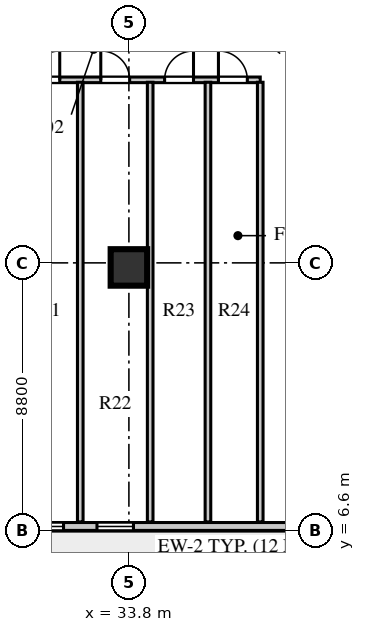
"""IFC4 building model, lengths in metres.
Left out: names, types, materials, properties, quantities, classifications, styles, units other than length and angle.
Written with IfcOpenShell. Run it as: python <this file> out.ifc"""

import sys

from ifc_helpers import new_model, si_unit, direction, frame, frame_2d, origin, origin_2d, place, context, subcontext, project, spatial, rectangle, extrude, element, fill, save


model = new_model("IFC4")
c1 = context("Model", 3, precision=1e-05, world=origin(), true_north=direction((0.0, 1.0)))
c2 = subcontext(c1, "Body", "Model", "MODEL_VIEW")
j1 = project(units=[si_unit("LENGTHUNIT", "METRE"), si_unit("PLANEANGLEUNIT", "RADIAN")], contexts=[c1])
p1 = place(None, origin())
s1 = spatial("IfcSite", under=j1, at=p1, CompositionType="ELEMENT")
p2 = place(p1, origin())
s2 = spatial("IfcBuilding", under=s1, at=p2, CompositionType="ELEMENT")
p3 = place(p2, frame((0.0, 0.0, 74.0)))
s3 = spatial("IfcBuildingStorey", under=s2, at=p3, CompositionType="ELEMENT", Elevation=74.0)
p4 = place(p3, frame((33.8, 15.25, 0.0), z_axis=(0.0, 0.0, 1.0), x_axis=(1.0, 0.0, 0.0)))
e1 = element("IfcColumn", 1, at=p4, inside=s3, PredefinedType="COLUMN", context=c2, shape_type="SweptSolid", body=[
    extrude(rectangle(XDim=1.2, YDim=1.2, at=origin_2d()), origin(), (0.0, 0.0, 1.0), 3.72),
])
p5 = place(p3, frame((12.3, 6.73, 0.0), z_axis=(0.0, 0.0, 1.0), x_axis=(1.0, 0.0, 0.0)))
e2 = element("IfcWall", 2, at=p5, inside=s3, PredefinedType="SOLIDWALL", context=c2, shape_type="SweptSolid", body=[
    extrude(rectangle(XDim=34.0, YDim=0.26, at=frame_2d((17.0, 0.0))), origin(), (0.0, 0.0, 1.0), 3.72),
])
p6 = place(p5, frame((0.95, 0.0, 0.0)))
e3 = element("IfcOpeningElement", 3, at=p6, cuts=e2, PredefinedType="OPENING", context=c2, shape_type="SweptSolid", body=[
    extrude(rectangle(XDim=1.0, YDim=2.05, at=frame_2d((0.5, 1.025))), frame((0.0, 0.14, 0.0), z_axis=(0.0, -1.0, 0.0), x_axis=(1.0, 0.0, 0.0)), (0.0, 0.0, 1.0), 0.28),
])
p7 = place(p5, frame((7.355, 0.0, 0.8)))
e4 = element("IfcOpeningElement", 4, at=p7, cuts=e2, PredefinedType="OPENING", context=c2, shape_type="SweptSolid", body=[
    extrude(rectangle(XDim=2.25, YDim=2.0, at=frame_2d((1.125, 1.0))), frame((0.0, 0.14, 0.0), z_axis=(0.0, -1.0, 0.0), x_axis=(1.0, 0.0, 0.0)), (0.0, 0.0, 1.0), 0.28),
])
p8 = place(p5, frame((15.85, 0.0, 0.8)))
e5 = element("IfcOpeningElement", 5, at=p8, cuts=e2, PredefinedType="OPENING", context=c2, shape_type="SweptSolid", body=[
    extrude(rectangle(XDim=1.2, YDim=1.75, at=frame_2d((0.6, 0.875))), frame((0.0, 0.14, 0.0), z_axis=(0.0, -1.0, 0.0), x_axis=(1.0, 0.0, 0.0)), (0.0, 0.0, 1.0), 0.28),
])
p9 = place(p5, frame((18.15, 0.0, 0.8)))
e6 = element("IfcOpeningElement", 6, at=p9, cuts=e2, PredefinedType="OPENING", context=c2, shape_type="SweptSolid", body=[
    extrude(rectangle(XDim=1.2, YDim=1.75, at=frame_2d((0.6, 0.875))), frame((0.0, 0.14, 0.0), z_axis=(0.0, -1.0, 0.0), x_axis=(1.0, 0.0, 0.0)), (0.0, 0.0, 1.0), 0.28),
])
p10 = place(p5, frame((20.45, 0.0, 0.8)))
e7 = element("IfcOpeningElement", 7, at=p10, cuts=e2, PredefinedType="OPENING", context=c2, shape_type="SweptSolid", body=[
    extrude(rectangle(XDim=1.2, YDim=1.75, at=frame_2d((0.6, 0.875))), frame((0.0, 0.14, 0.0), z_axis=(0.0, -1.0, 0.0), x_axis=(1.0, 0.0, 0.0)), (0.0, 0.0, 1.0), 0.28),
])
p11 = place(p5, frame((28.655, 0.0, 0.8)))
e8 = element("IfcOpeningElement", 8, at=p11, cuts=e2, PredefinedType="OPENING", context=c2, shape_type="SweptSolid", body=[
    extrude(rectangle(XDim=2.4, YDim=2.05, at=frame_2d((1.2, 1.025))), frame((0.0, 0.14, 0.0), z_axis=(0.0, -1.0, 0.0), x_axis=(1.0, 0.0, 0.0)), (0.0, 0.0, 1.0), 0.28),
])
p12 = place(p3, frame((25.25, 21.42, 0.0), z_axis=(0.0, 0.0, 1.0), x_axis=(1.0, 0.0, 0.0)))
e9 = element("IfcWall", 9, at=p12, inside=s3, PredefinedType="SOLIDWALL", context=c2, shape_type="SweptSolid", body=[
    extrude(rectangle(XDim=12.87, YDim=0.185, at=frame_2d((6.435, 0.0))), origin(), (0.0, 0.0, 1.0), 3.32),
])
p13 = place(p12, frame((0.725, 0.0, 0.0)))
e10 = element("IfcOpeningElement", 10, at=p13, cuts=e9, PredefinedType="OPENING", context=c2, shape_type="SweptSolid", body=[
    extrude(rectangle(XDim=0.95, YDim=2.08, at=frame_2d((0.475, 1.04))), frame((0.0, 0.103, 0.0), z_axis=(0.0, -1.0, 0.0), x_axis=(1.0, 0.0, 0.0)), (0.0, 0.0, 1.0), 0.205),
])
p14 = place(p12, frame((3.025, 0.0, 0.0)))
e11 = element("IfcOpeningElement", 11, at=p14, cuts=e9, PredefinedType="OPENING", context=c2, shape_type="SweptSolid", body=[
    extrude(rectangle(XDim=0.95, YDim=2.08, at=frame_2d((0.475, 1.04))), frame((0.0, 0.103, 0.0), z_axis=(0.0, -1.0, 0.0), x_axis=(1.0, 0.0, 0.0)), (0.0, 0.0, 1.0), 0.205),
])
p15 = place(p12, frame((5.325, 0.0, 0.0)))
e12 = element("IfcOpeningElement", 12, at=p15, cuts=e9, PredefinedType="OPENING", context=c2, shape_type="SweptSolid", body=[
    extrude(rectangle(XDim=0.95, YDim=2.08, at=frame_2d((0.475, 1.04))), frame((0.0, 0.103, 0.0), z_axis=(0.0, -1.0, 0.0), x_axis=(1.0, 0.0, 0.0)), (0.0, 0.0, 1.0), 0.205),
])
p16 = place(p12, frame((7.625, 0.0, 0.0)))
e13 = element("IfcOpeningElement", 13, at=p16, cuts=e9, PredefinedType="OPENING", context=c2, shape_type="SweptSolid", body=[
    extrude(rectangle(XDim=0.95, YDim=2.08, at=frame_2d((0.475, 1.04))), frame((0.0, 0.103, 0.0), z_axis=(0.0, -1.0, 0.0), x_axis=(1.0, 0.0, 0.0)), (0.0, 0.0, 1.0), 0.205),
])
p17 = place(p12, frame((9.725, 0.0, 0.0)))
e14 = element("IfcOpeningElement", 14, at=p17, cuts=e9, PredefinedType="OPENING", context=c2, shape_type="SweptSolid", body=[
    extrude(rectangle(XDim=0.95, YDim=2.08, at=frame_2d((0.475, 1.04))), frame((0.0, 0.103, 0.0), z_axis=(0.0, -1.0, 0.0), x_axis=(1.0, 0.0, 0.0)), (0.0, 0.0, 1.0), 0.205),
])
p18 = place(p12, frame((11.495, 0.0, 0.0)))
e15 = element("IfcOpeningElement", 15, at=p18, cuts=e9, PredefinedType="OPENING", context=c2, shape_type="SweptSolid", body=[
    extrude(rectangle(XDim=0.95, YDim=2.08, at=frame_2d((0.475, 1.04))), frame((0.0, 0.103, 0.0), z_axis=(0.0, -1.0, 0.0), x_axis=(1.0, 0.0, 0.0)), (0.0, 0.0, 1.0), 0.205),
])
for number, where, z_axis, x_axis in (
    (16, (38.12, 6.88, 0.0), (0.0, 0.0, 1.0), (0.0, 1.0, 0.0)),
    (17, (32.2, 6.88, 0.0), (0.0, 0.0, 1.0), (0.0, 1.0, 0.0)),
    (18, (34.5, 6.88, 0.0), (0.0, 0.0, 1.0), (0.0, 1.0, 0.0)),
    (19, (36.4, 6.88, 0.0), (0.0, 0.0, 1.0), (0.0, 1.0, 0.0)),
):
    element("IfcWall", number, at=place(p3, frame(where, z_axis=z_axis, x_axis=x_axis)), inside=s3, PredefinedType="SOLIDWALL", context=c2, shape_type="SweptSolid", body=[
        extrude(rectangle(XDim=14.46, YDim=0.185, at=frame_2d((7.23, 0.0))), origin(), (0.0, 0.0, 1.0), 3.72),
    ])
p19 = place(p9, origin())
e20 = element("IfcWindow", 20, at=p19, inside=s3, PartitioningType="SINGLE_PANEL", PredefinedType="WINDOW", context=c2, shape_type="SweptSolid", body=[
    extrude(rectangle(XDim=1.2, YDim=1.75, at=frame_2d((0.6, 0.875))), frame((0.0, 0.03, 0.0), z_axis=(0.0, -1.0, 0.0), x_axis=(1.0, 0.0, 0.0)), (0.0, 0.0, 1.0), 0.06),
])
fill(e6, e20)
p20 = place(p10, origin())
e21 = element("IfcWindow", 21, at=p20, inside=s3, PartitioningType="SINGLE_PANEL", PredefinedType="WINDOW", context=c2, shape_type="SweptSolid", body=[
    extrude(rectangle(XDim=1.2, YDim=1.75, at=frame_2d((0.6, 0.875))), frame((0.0, 0.03, 0.0), z_axis=(0.0, -1.0, 0.0), x_axis=(1.0, 0.0, 0.0)), (0.0, 0.0, 1.0), 0.06),
])
fill(e7, e21)
p21 = place(p15, frame((0.95, 0.0, 0.0), z_axis=(0.0, 0.0, 1.0), x_axis=(-1.0, 0.0, 0.0)))
e22 = element("IfcDoor", 22, at=p21, inside=s3, OperationType="SINGLE_SWING_LEFT", PredefinedType="DOOR", context=c2, shape_type="SweptSolid", body=[
    extrude(rectangle(XDim=0.95, YDim=2.08, at=frame_2d((0.475, 1.04))), frame((0.0, 0.025, 0.0), z_axis=(0.0, -1.0, 0.0), x_axis=(1.0, 0.0, 0.0)), (0.0, 0.0, 1.0), 0.05),
])
fill(e12, e22)
p22 = place(p16, frame((0.95, 0.0, 0.0), z_axis=(0.0, 0.0, 1.0), x_axis=(-1.0, 0.0, 0.0)))
e23 = element("IfcDoor", 23, at=p22, inside=s3, OperationType="SINGLE_SWING_RIGHT", PredefinedType="DOOR", context=c2, shape_type="SweptSolid", body=[
    extrude(rectangle(XDim=0.95, YDim=2.08, at=frame_2d((0.475, 1.04))), frame((0.0, 0.025, 0.0), z_axis=(0.0, -1.0, 0.0), x_axis=(1.0, 0.0, 0.0)), (0.0, 0.0, 1.0), 0.05),
])
fill(e13, e23)
p23 = place(p17, frame((0.95, 0.0, 0.0), z_axis=(0.0, 0.0, 1.0), x_axis=(-1.0, 0.0, 0.0)))
e24 = element("IfcDoor", 24, at=p23, inside=s3, OperationType="SINGLE_SWING_LEFT", PredefinedType="DOOR", context=c2, shape_type="SweptSolid", body=[
    extrude(rectangle(XDim=0.95, YDim=2.08, at=frame_2d((0.475, 1.04))), frame((0.0, 0.025, 0.0), z_axis=(0.0, -1.0, 0.0), x_axis=(1.0, 0.0, 0.0)), (0.0, 0.0, 1.0), 0.05),
])
fill(e14, e24)
p24 = place(p18, frame((0.95, 0.0, 0.0), z_axis=(0.0, 0.0, 1.0), x_axis=(-1.0, 0.0, 0.0)))
e25 = element("IfcDoor", 25, at=p24, inside=s3, OperationType="SINGLE_SWING_RIGHT", PredefinedType="DOOR", context=c2, shape_type="SweptSolid", body=[
    extrude(rectangle(XDim=0.95, YDim=2.08, at=frame_2d((0.475, 1.04))), frame((0.0, 0.025, 0.0), z_axis=(0.0, -1.0, 0.0), x_axis=(1.0, 0.0, 0.0)), (0.0, 0.0, 1.0), 0.05),
])
fill(e15, e25)
save(model, sys.argv[1])
